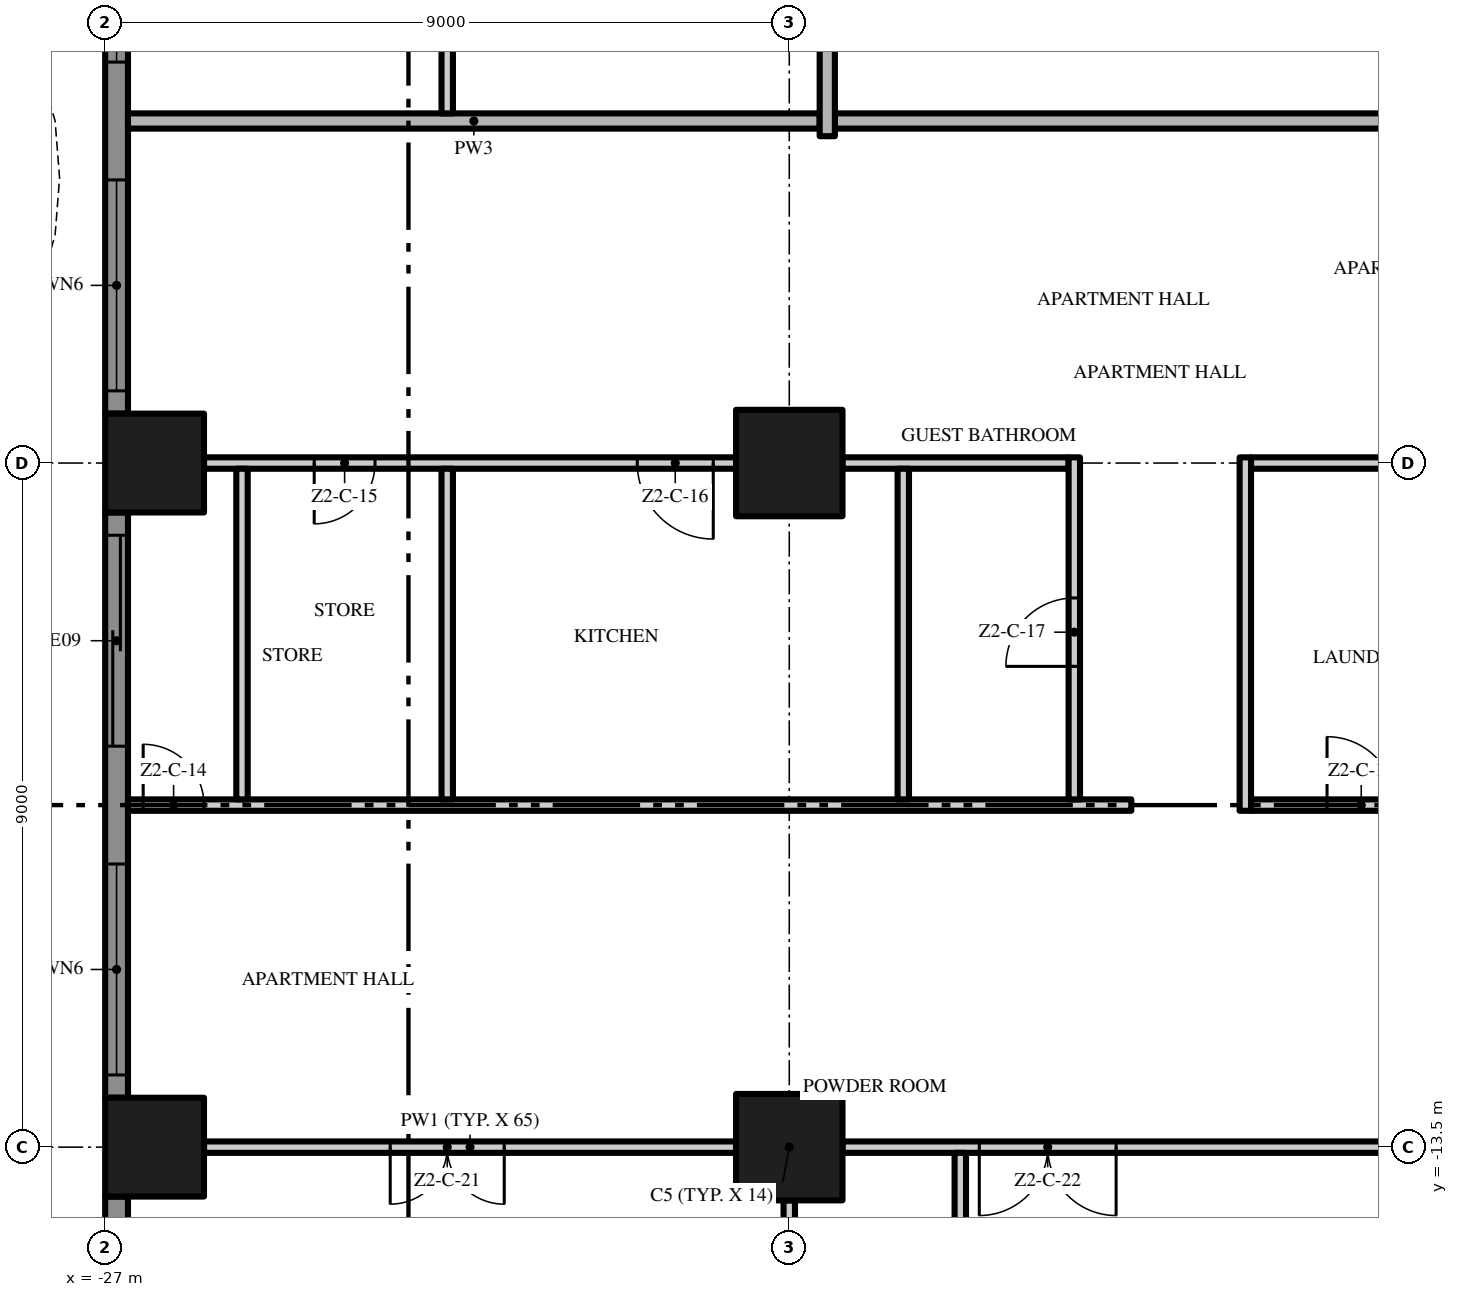
"""IFC4 building model, lengths in metres.
Left out: names, types, materials, properties, quantities, classifications, styles, units other than length and angle.
Written with IfcOpenShell. Run it as: python <this file> out.ifc"""

import sys

from ifc_helpers import new_model, si_unit, direction, frame, frame_2d, origin, origin_2d, place, context, subcontext, project, spatial, polyline, rectangle, outline, extrude, element, fill, save


model = new_model("IFC4")
c1 = context("Model", 3, precision=1e-05, world=origin(), true_north=direction((0.0, 1.0)))
c2 = subcontext(c1, "Body", "Model", "MODEL_VIEW")
j1 = project(units=[si_unit("LENGTHUNIT", "METRE"), si_unit("PLANEANGLEUNIT", "RADIAN")], contexts=[c1])
p1 = place(None, origin())
s1 = spatial("IfcSite", under=j1, at=p1, CompositionType="ELEMENT")
p2 = place(p1, origin())
s2 = spatial("IfcBuilding", under=s1, at=p2, CompositionType="ELEMENT")
p3 = place(p2, frame((0.0, 0.0, 92.2)))
s3 = spatial("IfcBuildingStorey", under=s2, at=p3, CompositionType="ELEMENT", Elevation=92.2)
for number, where, z_axis, x_axis in (
    (1, (-18.0, -13.5, 0.0), (0.0, 0.0, 1.0), (1.0, 0.0, 0.0)),
    (2, (-18.0, -4.5, 0.0), (0.0, 0.0, 1.0), (1.0, 0.0, 0.0)),
):
    element("IfcColumn", number, at=place(p3, frame(where, z_axis=z_axis, x_axis=x_axis)), inside=s3, PredefinedType="COLUMN", context=c2, shape_type="SweptSolid", body=[
        extrude(rectangle(XDim=1.4, YDim=1.4, at=origin_2d()), origin(), (0.0, 0.0, 1.0), 3.5),
    ])
for number, where, z_axis, x_axis in (
    (3, (-26.35, -13.5, 0.0), (0.0, 0.0, 1.0), (1.0, 0.0, 0.0)),
    (4, (-26.35, -4.5, 0.0), (0.0, 0.0, 1.0), (1.0, 0.0, 0.0)),
):
    element("IfcColumn", number, at=place(p3, frame(where, z_axis=z_axis, x_axis=x_axis)), inside=s3, PredefinedType="COLUMN", context=c2, shape_type="SweptSolid", body=[
        extrude(rectangle(XDim=1.3, YDim=1.3, at=origin_2d()), origin(), (0.0, 0.0, 1.0), 3.5),
    ])
p4 = place(p3, frame((-26.85, -3.85, 0.0), z_axis=(0.0, 0.0, 1.0), x_axis=(0.0, 1.0, 0.0)))
e5 = element("IfcWall", 5, at=p4, inside=s3, PredefinedType="SOLIDWALL", context=c2, shape_type="SweptSolid", body=[
    extrude(rectangle(XDim=7.7, YDim=0.3, at=frame_2d((3.85, 0.0))), origin(), (0.0, 0.0, 1.0), 3.5),
])
p5 = place(p4, frame((4.625, 0.0, 0.45)))
e6 = element("IfcOpeningElement", 6, at=p5, cuts=e5, PredefinedType="OPENING", context=c2, shape_type="SweptSolid", body=[
    extrude(rectangle(XDim=2.775, YDim=2.65, at=frame_2d((1.387, 1.325))), frame((0.0, 0.16, 0.0), z_axis=(0.0, -1.0, 0.0), x_axis=(1.0, 0.0, 0.0)), (0.0, 0.0, 1.0), 0.32),
])
p6 = place(p4, frame((0.3, 0.0, 0.45)))
e7 = element("IfcOpeningElement", 7, at=p6, cuts=e5, PredefinedType="OPENING", context=c2, shape_type="SweptSolid", body=[
    extrude(rectangle(XDim=2.775, YDim=2.65, at=frame_2d((1.387, 1.325))), frame((0.0, 0.16, 0.0), z_axis=(0.0, -1.0, 0.0), x_axis=(1.0, 0.0, 0.0)), (0.0, 0.0, 1.0), 0.32),
])
p7 = place(p3, frame((-26.85, -12.85, 0.0), z_axis=(0.0, 0.0, 1.0), x_axis=(0.0, 1.0, 0.0)))
e8 = element("IfcWall", 8, at=p7, inside=s3, PredefinedType="SOLIDWALL", context=c2, shape_type="SweptSolid", body=[
    extrude(rectangle(XDim=7.7, YDim=0.3, at=frame_2d((3.85, 0.0))), origin(), (0.0, 0.0, 1.0), 3.5),
])
p8 = place(p7, frame((4.625, 0.0, 0.0)))
e9 = element("IfcOpeningElement", 9, at=p8, cuts=e8, PredefinedType="OPENING", context=c2, shape_type="SweptSolid", body=[
    extrude(rectangle(XDim=2.775, YDim=2.4, at=frame_2d((1.387, 1.2))), frame((0.0, 0.16, 0.0), z_axis=(0.0, -1.0, 0.0), x_axis=(1.0, 0.0, 0.0)), (0.0, 0.0, 1.0), 0.32),
])
p9 = place(p7, frame((0.3, 0.0, 0.45)))
e10 = element("IfcOpeningElement", 10, at=p9, cuts=e8, PredefinedType="OPENING", context=c2, shape_type="SweptSolid", body=[
    extrude(rectangle(XDim=2.775, YDim=2.65, at=frame_2d((1.387, 1.325))), frame((0.0, 0.16, 0.0), z_axis=(0.0, -1.0, 0.0), x_axis=(1.0, 0.0, 0.0)), (0.0, 0.0, 1.0), 0.32),
])
p10 = place(p3, frame((-26.85, -18.0, 0.0), z_axis=(0.0, 0.0, 1.0), x_axis=(0.0, 1.0, 0.0)))
e11 = element("IfcWall", 11, at=p10, inside=s3, PredefinedType="SOLIDWALL", context=c2, shape_type="SweptSolid", body=[
    extrude(rectangle(XDim=3.85, YDim=0.3, at=frame_2d((1.925, 0.0))), origin(), (0.0, 0.0, 1.0), 3.5),
])
p11 = place(p10, frame((0.775, 0.0, 0.45)))
e12 = element("IfcOpeningElement", 12, at=p11, cuts=e11, PredefinedType="OPENING", context=c2, shape_type="SweptSolid", body=[
    extrude(rectangle(XDim=2.775, YDim=2.65, at=frame_2d((1.387, 1.325))), frame((0.0, 0.16, 0.0), z_axis=(0.0, -1.0, 0.0), x_axis=(1.0, 0.0, 0.0)), (0.0, 0.0, 1.0), 0.32),
])
p12 = place(p3, origin())
e13 = element("IfcWall", 13, at=p12, inside=s3, PredefinedType="USERDEFINED", context=c2, shape_type="SweptSolid", body=[
    extrude(outline(polyline([(-28.8, 18.0), (-28.095, 16.5), (-27.659, 15.0), (-27.6, 14.25), (-27.659, 13.5), (-28.095, 12.0), (-28.8, 10.5), (-29.505, 9.0), (-29.941, 7.5), (-30.0, 6.75), (-29.941, 6.0), (-29.505, 4.5), (-28.8, 3.0), (-28.095, 1.5), (-27.659, 0.0), (-27.6, -0.75), (-27.659, -1.5), (-28.095, -3.0), (-28.8, -4.5), (-29.505, -6.0), (-29.941, -7.5), (-30.0, -8.25), (-29.941, -9.0), (-29.505, -10.5), (-28.8, -12.0), (-28.095, -13.5), (-27.659, -15.0), (-27.6, -15.75), (-27.659, -16.5), (-28.095, -18.0), (-27.855, -18.07), (-27.411, -16.545), (-27.349, -15.75), (-27.411, -14.955), (-27.86, -13.411), (-28.574, -11.894), (-29.271, -10.411), (-29.694, -8.955), (-29.749, -8.25), (-29.694, -7.545), (-29.271, -6.089), (-28.574, -4.606), (-27.86, -3.089), (-27.411, -1.545), (-27.349, -0.75), (-27.411, 0.045), (-27.86, 1.589), (-28.574, 3.106), (-29.271, 4.589), (-29.694, 6.045), (-29.749, 6.75), (-29.694, 7.455), (-29.271, 8.911), (-28.574, 10.394), (-27.86, 11.911), (-27.411, 13.455), (-27.349, 14.25), (-27.411, 15.045), (-27.86, 16.589), (-28.574, 18.106), (-28.8, 18.0)])), origin(), (0.0, 0.0, 1.0), 0.9),
])
p13 = place(p3, frame((-18.7, -13.5, 0.0), z_axis=(0.0, 0.0, 1.0), x_axis=(-1.0, 0.0, 0.0)))
e14 = element("IfcWall", 14, at=p13, inside=s3, PredefinedType="PARTITIONING", context=c2, shape_type="SweptSolid", body=[
    extrude(rectangle(XDim=7.0, YDim=0.15, at=frame_2d((3.5, 0.0))), origin(), (0.0, 0.0, 1.0), 3.5),
])
p14 = place(p13, frame((3.05, 0.0, 0.0)))
e15 = element("IfcOpeningElement", 15, at=p14, cuts=e14, PredefinedType="OPENING", context=c2, shape_type="SweptSolid", body=[
    extrude(rectangle(XDim=1.5, YDim=2.4, at=frame_2d((0.75, 1.2))), frame((0.0, 0.085, 0.0), z_axis=(0.0, -1.0, 0.0), x_axis=(1.0, 0.0, 0.0)), (0.0, 0.0, 1.0), 0.17),
])
p15 = place(p3, frame((-9.7, -13.5, 0.0), z_axis=(0.0, 0.0, 1.0), x_axis=(-1.0, 0.0, 0.0)))
e16 = element("IfcWall", 16, at=p15, inside=s3, PredefinedType="PARTITIONING", context=c2, shape_type="SweptSolid", body=[
    extrude(rectangle(XDim=7.6, YDim=0.15, at=frame_2d((3.8, 0.0))), origin(), (0.0, 0.0, 1.0), 3.5),
])
p16 = place(p15, frame((4.0, 0.0, 0.0)))
e17 = element("IfcOpeningElement", 17, at=p16, cuts=e16, PredefinedType="OPENING", context=c2, shape_type="SweptSolid", body=[
    extrude(rectangle(XDim=1.8, YDim=2.4, at=frame_2d((0.9, 1.2))), frame((0.0, 0.085, 0.0), z_axis=(0.0, -1.0, 0.0), x_axis=(1.0, 0.0, 0.0)), (0.0, 0.0, 1.0), 0.17),
])
p17 = place(p3, frame((-26.7, -9.0, 0.0), z_axis=(0.0, 0.0, 1.0), x_axis=(1.0, 0.0, 0.0)))
e18 = element("IfcWall", 18, at=p17, inside=s3, PredefinedType="PARTITIONING", context=c2, shape_type="SweptSolid", body=[
    extrude(rectangle(XDim=13.2, YDim=0.15, at=frame_2d((6.6, 0.0))), origin(), (0.0, 0.0, 1.0), 3.5),
])
p18 = place(p17, frame((0.2, 0.0, 0.0)))
e19 = element("IfcOpeningElement", 19, at=p18, cuts=e18, PredefinedType="OPENING", context=c2, shape_type="SweptSolid", body=[
    extrude(rectangle(XDim=0.8, YDim=2.0, at=frame_2d((0.4, 1.0))), frame((0.0, 0.085, 0.0), z_axis=(0.0, -1.0, 0.0), x_axis=(1.0, 0.0, 0.0)), (0.0, 0.0, 1.0), 0.17),
])
p19 = place(p3, frame((-11.925, -9.0, 0.0), z_axis=(0.0, 0.0, 1.0), x_axis=(1.0, 0.0, 0.0)))
e20 = element("IfcWall", 20, at=p19, inside=s3, PredefinedType="PARTITIONING", context=c2, shape_type="SweptSolid", body=[
    extrude(rectangle(XDim=11.825, YDim=0.15, at=frame_2d((5.912, 0.0))), origin(), (0.0, 0.0, 1.0), 3.5),
])
p20 = place(p19, frame((1.0, 0.0, 0.0)))
e21 = element("IfcOpeningElement", 21, at=p20, cuts=e20, PredefinedType="OPENING", context=c2, shape_type="SweptSolid", body=[
    extrude(rectangle(XDim=0.9, YDim=2.1, at=frame_2d((0.45, 1.05))), frame((0.0, 0.085, 0.0), z_axis=(0.0, -1.0, 0.0), x_axis=(1.0, 0.0, 0.0)), (0.0, 0.0, 1.0), 0.17),
])
p21 = place(p19, frame((5.075, 0.0, 0.0)))
e22 = element("IfcOpeningElement", 22, at=p21, cuts=e20, PredefinedType="OPENING", context=c2, shape_type="SweptSolid", body=[
    extrude(rectangle(XDim=0.9, YDim=2.1, at=frame_2d((0.45, 1.05))), frame((0.0, 0.085, 0.0), z_axis=(0.0, -1.0, 0.0), x_axis=(1.0, 0.0, 0.0)), (0.0, 0.0, 1.0), 0.17),
])
p22 = place(p3, frame((-18.7, -4.5, 0.0), z_axis=(0.0, 0.0, 1.0), x_axis=(-1.0, 0.0, 0.0)))
e23 = element("IfcWall", 23, at=p22, inside=s3, PredefinedType="PARTITIONING", context=c2, shape_type="SweptSolid", body=[
    extrude(rectangle(XDim=7.0, YDim=0.15, at=frame_2d((3.5, 0.0))), origin(), (0.0, 0.0, 1.0), 3.5),
])
p23 = place(p22, frame((4.75, 0.0, 0.0)))
e24 = element("IfcOpeningElement", 24, at=p23, cuts=e23, PredefinedType="OPENING", context=c2, shape_type="SweptSolid", body=[
    extrude(rectangle(XDim=0.8, YDim=2.0, at=frame_2d((0.4, 1.0))), frame((0.0, 0.085, 0.0), z_axis=(0.0, -1.0, 0.0), x_axis=(1.0, 0.0, 0.0)), (0.0, 0.0, 1.0), 0.17),
])
p24 = place(p22, frame((0.3, 0.0, 0.0)))
e25 = element("IfcOpeningElement", 25, at=p24, cuts=e23, PredefinedType="OPENING", context=c2, shape_type="SweptSolid", body=[
    extrude(rectangle(XDim=1.0, YDim=2.4, at=frame_2d((0.5, 1.2))), frame((0.0, 0.085, 0.0), z_axis=(0.0, -1.0, 0.0), x_axis=(1.0, 0.0, 0.0)), (0.0, 0.0, 1.0), 0.17),
])
p25 = place(p3, frame((-17.3, -4.5, 0.0), z_axis=(0.0, 0.0, 1.0), x_axis=(1.0, 0.0, 0.0)))
e26 = element("IfcWall", 26, at=p25, inside=s3, PredefinedType="PARTITIONING", context=c2, shape_type="SweptSolid", body=[
    extrude(rectangle(XDim=2.975, YDim=0.15, at=frame_2d((1.488, 0.0))), origin(), (0.0, 0.0, 1.0), 3.5),
])
p26 = place(p3, frame((-11.925, -4.5, 0.0), z_axis=(0.0, 0.0, 1.0), x_axis=(1.0, 0.0, 0.0)))
e27 = element("IfcWall", 27, at=p26, inside=s3, PredefinedType="PARTITIONING", context=c2, shape_type="SweptSolid", body=[
    extrude(rectangle(XDim=2.225, YDim=0.15, at=frame_2d((1.113, 0.0))), origin(), (0.0, 0.0, 1.0), 3.5),
])
p27 = place(p3, frame((-0.1, 0.0, 0.0), z_axis=(0.0, 0.0, 1.0), x_axis=(-1.0, 0.0, 0.0)))
e28 = element("IfcWall", 28, at=p27, inside=s3, PredefinedType="PARTITIONING", context=c2, shape_type="SweptSolid", body=[
    extrude(rectangle(XDim=17.3, YDim=0.2, at=frame_2d((8.65, 0.0))), origin(), (0.0, 0.0, 1.0), 3.5),
])
p28 = place(p27, frame((8.15, 0.0, 0.0)))
e29 = element("IfcOpeningElement", 29, at=p28, cuts=e28, PredefinedType="OPENING", context=c2, shape_type="SweptSolid", body=[
    extrude(rectangle(XDim=1.5, YDim=2.4, at=frame_2d((0.75, 1.2))), frame((0.0, 0.11, 0.0), z_axis=(0.0, -1.0, 0.0), x_axis=(1.0, 0.0, 0.0)), (0.0, 0.0, 1.0), 0.22),
])
p29 = place(p3, frame((-26.7, 0.0, 0.0), z_axis=(0.0, 0.0, 1.0), x_axis=(1.0, 0.0, 0.0)))
e30 = element("IfcWall", 30, at=p29, inside=s3, PredefinedType="PARTITIONING", context=c2, shape_type="SweptSolid", body=[
    extrude(rectangle(XDim=9.1, YDim=0.2, at=frame_2d((4.55, 0.0))), origin(), (0.0, 0.0, 1.0), 3.5),
])
for number, where, z_axis, x_axis in (
    (31, (-25.2, -8.925, 0.0), (0.0, 0.0, 1.0), (0.0, 1.0, 0.0)),
    (32, (-22.5, -8.925, 0.0), (0.0, 0.0, 1.0), (0.0, 1.0, 0.0)),
):
    element("IfcWall", number, at=place(p3, frame(where, z_axis=z_axis, x_axis=x_axis)), inside=s3, PredefinedType="PARTITIONING", context=c2, shape_type="SweptSolid", body=[
        extrude(rectangle(XDim=4.35, YDim=0.15, at=frame_2d((2.175, 0.0))), origin(), (0.0, 0.0, 1.0), 3.5),
    ])
p30 = place(p3, frame((-22.5, 0.1, 0.0), z_axis=(0.0, 0.0, 1.0), x_axis=(0.0, 1.0, 0.0)))
e33 = element("IfcWall", 33, at=p30, inside=s3, PredefinedType="PARTITIONING", context=c2, shape_type="SweptSolid", body=[
    extrude(rectangle(XDim=17.25, YDim=0.15, at=frame_2d((8.625, 0.0))), origin(), (0.0, 0.0, 1.0), 3.5),
])
p31 = place(p30, frame((1.65, 0.0, 0.0)))
e34 = element("IfcOpeningElement", 34, at=p31, cuts=e33, PredefinedType="OPENING", context=c2, shape_type="SweptSolid", body=[
    extrude(rectangle(XDim=1.0, YDim=2.4, at=frame_2d((0.5, 1.2))), frame((0.0, 0.085, 0.0), z_axis=(0.0, -1.0, 0.0), x_axis=(1.0, 0.0, 0.0)), (0.0, 0.0, 1.0), 0.17),
])
p32 = place(p30, frame((7.25, 0.0, 0.0)))
e35 = element("IfcOpeningElement", 35, at=p32, cuts=e33, PredefinedType="OPENING", context=c2, shape_type="SweptSolid", body=[
    extrude(rectangle(XDim=1.0, YDim=2.4, at=frame_2d((0.5, 1.2))), frame((0.0, 0.085, 0.0), z_axis=(0.0, -1.0, 0.0), x_axis=(1.0, 0.0, 0.0)), (0.0, 0.0, 1.0), 0.17),
])
p33 = place(p30, frame((11.4, 0.0, 0.0)))
e36 = element("IfcOpeningElement", 36, at=p33, cuts=e33, PredefinedType="OPENING", context=c2, shape_type="SweptSolid", body=[
    extrude(rectangle(XDim=1.8, YDim=2.4, at=frame_2d((0.9, 1.2))), frame((0.0, 0.085, 0.0), z_axis=(0.0, -1.0, 0.0), x_axis=(1.0, 0.0, 0.0)), (0.0, 0.0, 1.0), 0.17),
])
p34 = place(p3, frame((-18.0, -21.2, 0.0), z_axis=(0.0, 0.0, 1.0), x_axis=(0.0, 1.0, 0.0)))
e37 = element("IfcWall", 37, at=p34, inside=s3, PredefinedType="PARTITIONING", context=c2, shape_type="SweptSolid", body=[
    extrude(rectangle(XDim=7.0, YDim=0.15, at=frame_2d((3.5, 0.0))), origin(), (0.0, 0.0, 1.0), 3.5),
])
p35 = place(p3, frame((-17.5, -0.2, 0.0), z_axis=(0.0, 0.0, 1.0), x_axis=(0.0, 1.0, 0.0)))
e38 = element("IfcWall", 38, at=p35, inside=s3, PredefinedType="PARTITIONING", context=c2, shape_type="SweptSolid", body=[
    extrude(rectangle(XDim=4.0, YDim=0.2, at=frame_2d((2.0, 0.0))), origin(), (0.0, 0.0, 1.0), 3.5),
])
p36 = place(p3, frame((-16.5, -8.925, 0.0), z_axis=(0.0, 0.0, 1.0), x_axis=(0.0, 1.0, 0.0)))
e39 = element("IfcWall", 39, at=p36, inside=s3, PredefinedType="PARTITIONING", context=c2, shape_type="SweptSolid", body=[
    extrude(rectangle(XDim=4.35, YDim=0.15, at=frame_2d((2.175, 0.0))), origin(), (0.0, 0.0, 1.0), 3.5),
])
p37 = place(p3, frame((-15.75, -16.575, 0.0), z_axis=(0.0, 0.0, 1.0), x_axis=(0.0, 1.0, 0.0)))
e40 = element("IfcWall", 40, at=p37, inside=s3, PredefinedType="PARTITIONING", context=c2, shape_type="SweptSolid", body=[
    extrude(rectangle(XDim=3.0, YDim=0.15, at=frame_2d((1.5, 0.0))), origin(), (0.0, 0.0, 1.0), 3.5),
])
p38 = place(p3, frame((-14.25, -8.925, 0.0), z_axis=(0.0, 0.0, 1.0), x_axis=(0.0, 1.0, 0.0)))
e41 = element("IfcWall", 41, at=p38, inside=s3, PredefinedType="PARTITIONING", context=c2, shape_type="SweptSolid", body=[
    extrude(rectangle(XDim=4.5, YDim=0.15, at=frame_2d((2.25, 0.0))), origin(), (0.0, 0.0, 1.0), 3.5),
])
p39 = place(p38, frame((1.75, 0.0, 0.0)))
e42 = element("IfcOpeningElement", 42, at=p39, cuts=e41, PredefinedType="OPENING", context=c2, shape_type="SweptSolid", body=[
    extrude(rectangle(XDim=0.9, YDim=2.1, at=frame_2d((0.45, 1.05))), frame((0.0, 0.085, 0.0), z_axis=(0.0, -1.0, 0.0), x_axis=(1.0, 0.0, 0.0)), (0.0, 0.0, 1.0), 0.17),
])
p40 = place(p3, frame((-12.0, -9.075, 0.0), z_axis=(0.0, 0.0, 1.0), x_axis=(0.0, 1.0, 0.0)))
e43 = element("IfcWall", 43, at=p40, inside=s3, PredefinedType="PARTITIONING", context=c2, shape_type="SweptSolid", body=[
    extrude(rectangle(XDim=4.65, YDim=0.15, at=frame_2d((2.325, 0.0))), origin(), (0.0, 0.0, 1.0), 3.5),
])
p41 = place(p5, origin())
e44 = element("IfcWindow", 44, at=p41, inside=s3, PartitioningType="SINGLE_PANEL", PredefinedType="WINDOW", context=c2, shape_type="SweptSolid", body=[
    extrude(rectangle(XDim=2.775, YDim=2.65, at=frame_2d((1.387, 1.325))), frame((0.0, 0.03, 0.0), z_axis=(0.0, -1.0, 0.0), x_axis=(1.0, 0.0, 0.0)), (0.0, 0.0, 1.0), 0.06),
])
fill(e6, e44)
p42 = place(p6, origin())
e45 = element("IfcWindow", 45, at=p42, inside=s3, PartitioningType="SINGLE_PANEL", PredefinedType="WINDOW", context=c2, shape_type="SweptSolid", body=[
    extrude(rectangle(XDim=2.775, YDim=2.65, at=frame_2d((1.387, 1.325))), frame((0.0, 0.03, 0.0), z_axis=(0.0, -1.0, 0.0), x_axis=(1.0, 0.0, 0.0)), (0.0, 0.0, 1.0), 0.06),
])
fill(e7, e45)
p43 = place(p8, origin())
e46 = element("IfcDoor", 46, at=p43, inside=s3, OperationType="SINGLE_SWING_LEFT", PredefinedType="DOOR", context=c2, shape_type="SweptSolid", body=[
    extrude(rectangle(XDim=2.775, YDim=2.4, at=frame_2d((1.387, 1.2))), frame((0.0, 0.025, 0.0), z_axis=(0.0, -1.0, 0.0), x_axis=(1.0, 0.0, 0.0)), (0.0, 0.0, 1.0), 0.05),
])
fill(e9, e46)
p44 = place(p9, origin())
e47 = element("IfcWindow", 47, at=p44, inside=s3, PartitioningType="SINGLE_PANEL", PredefinedType="WINDOW", context=c2, shape_type="SweptSolid", body=[
    extrude(rectangle(XDim=2.775, YDim=2.65, at=frame_2d((1.387, 1.325))), frame((0.0, 0.03, 0.0), z_axis=(0.0, -1.0, 0.0), x_axis=(1.0, 0.0, 0.0)), (0.0, 0.0, 1.0), 0.06),
])
fill(e10, e47)
p45 = place(p18, origin())
e48 = element("IfcDoor", 48, at=p45, inside=s3, OperationType="SINGLE_SWING_LEFT", PredefinedType="DOOR", context=c2, shape_type="SweptSolid", body=[
    extrude(rectangle(XDim=0.8, YDim=2.0, at=frame_2d((0.4, 1.0))), frame((0.0, 0.025, 0.0), z_axis=(0.0, -1.0, 0.0), x_axis=(1.0, 0.0, 0.0)), (0.0, 0.0, 1.0), 0.05),
])
fill(e19, e48)
p46 = place(p23, origin())
e49 = element("IfcDoor", 49, at=p46, inside=s3, OperationType="SINGLE_SWING_RIGHT", PredefinedType="DOOR", context=c2, shape_type="SweptSolid", body=[
    extrude(rectangle(XDim=0.8, YDim=2.0, at=frame_2d((0.4, 1.0))), frame((0.0, 0.025, 0.0), z_axis=(0.0, -1.0, 0.0), x_axis=(1.0, 0.0, 0.0)), (0.0, 0.0, 1.0), 0.05),
])
fill(e24, e49)
p47 = place(p24, origin())
e50 = element("IfcDoor", 50, at=p47, inside=s3, OperationType="SINGLE_SWING_LEFT", PredefinedType="DOOR", context=c2, shape_type="SweptSolid", body=[
    extrude(rectangle(XDim=1.0, YDim=2.4, at=frame_2d((0.5, 1.2))), frame((0.0, 0.025, 0.0), z_axis=(0.0, -1.0, 0.0), x_axis=(1.0, 0.0, 0.0)), (0.0, 0.0, 1.0), 0.05),
])
fill(e25, e50)
p48 = place(p39, origin())
e51 = element("IfcDoor", 51, at=p48, inside=s3, OperationType="SINGLE_SWING_LEFT", PredefinedType="DOOR", context=c2, shape_type="SweptSolid", body=[
    extrude(rectangle(XDim=0.9, YDim=2.1, at=frame_2d((0.45, 1.05))), frame((0.0, 0.025, 0.0), z_axis=(0.0, -1.0, 0.0), x_axis=(1.0, 0.0, 0.0)), (0.0, 0.0, 1.0), 0.05),
])
fill(e42, e51)
p49 = place(p20, origin())
e52 = element("IfcDoor", 52, at=p49, inside=s3, OperationType="SINGLE_SWING_LEFT", PredefinedType="DOOR", context=c2, shape_type="SweptSolid", body=[
    extrude(rectangle(XDim=0.9, YDim=2.1, at=frame_2d((0.45, 1.05))), frame((0.0, 0.025, 0.0), z_axis=(0.0, -1.0, 0.0), x_axis=(1.0, 0.0, 0.0)), (0.0, 0.0, 1.0), 0.05),
])
fill(e21, e52)
p50 = place(p14, origin())
e53 = element("IfcDoor", 53, at=p50, inside=s3, OperationType="DOUBLE_DOOR_SINGLE_SWING", PredefinedType="DOOR", context=c2, shape_type="SweptSolid", body=[
    extrude(rectangle(XDim=1.5, YDim=2.4, at=frame_2d((0.75, 1.2))), frame((0.0, 0.025, 0.0), z_axis=(0.0, -1.0, 0.0), x_axis=(1.0, 0.0, 0.0)), (0.0, 0.0, 1.0), 0.05),
])
fill(e15, e53)
p51 = place(p16, origin())
e54 = element("IfcDoor", 54, at=p51, inside=s3, OperationType="DOUBLE_DOOR_SINGLE_SWING", PredefinedType="DOOR", context=c2, shape_type="SweptSolid", body=[
    extrude(rectangle(XDim=1.8, YDim=2.4, at=frame_2d((0.9, 1.2))), frame((0.0, 0.025, 0.0), z_axis=(0.0, -1.0, 0.0), x_axis=(1.0, 0.0, 0.0)), (0.0, 0.0, 1.0), 0.05),
])
fill(e17, e54)
save(model, sys.argv[1])
